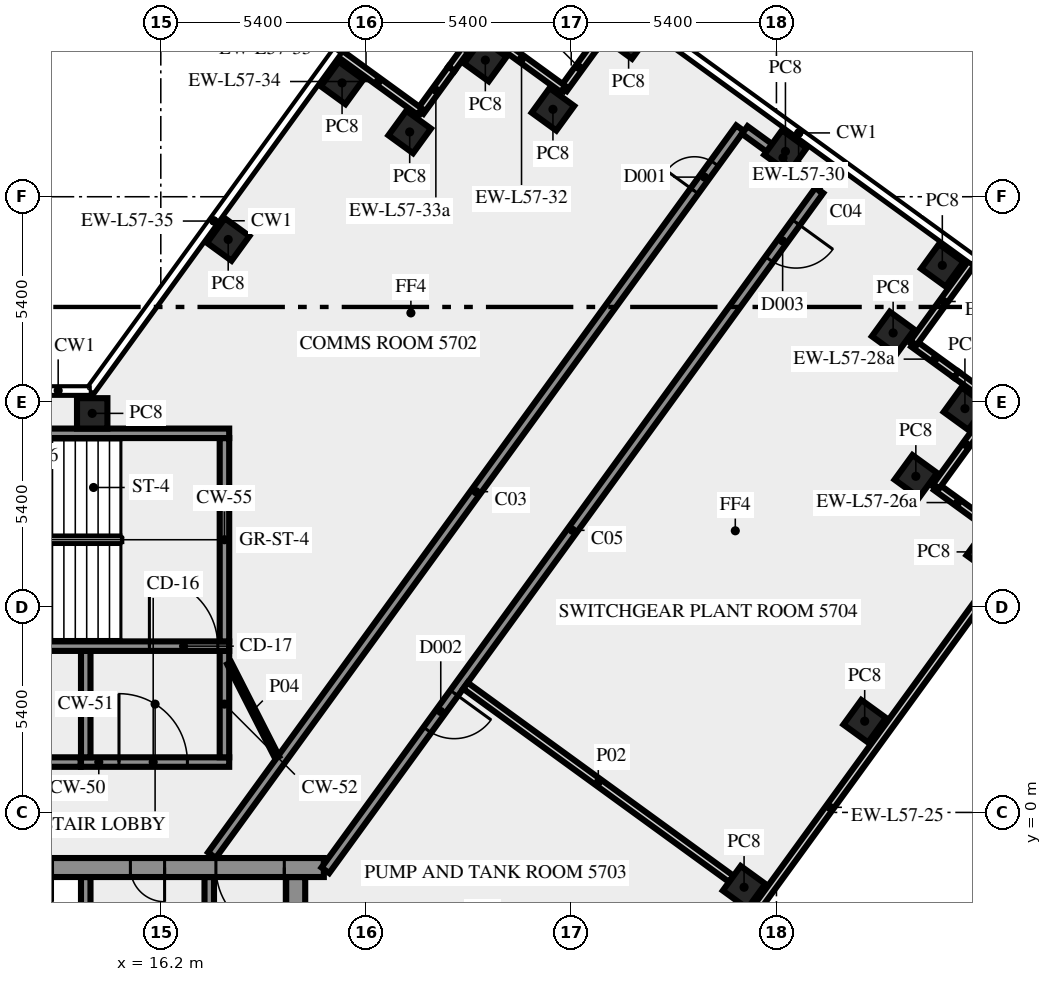
"""IFC4 building model, lengths in metres.
Left out: names, types, materials, properties, quantities, classifications, styles, units other than length and angle.
Written with IfcOpenShell. Run it as: python <this file> out.ifc"""

import sys

from ifc_helpers import new_model, si_unit, direction, frame, frame_2d, origin, origin_2d, place, context, subcontext, project, spatial, rectangle, extrude, element, fill, save


model = new_model("IFC4")
c1 = context("Model", 3, precision=1e-05, world=origin(), true_north=direction((0.0, 1.0)))
c2 = subcontext(c1, "Body", "Model", "MODEL_VIEW")
j1 = project(units=[si_unit("LENGTHUNIT", "METRE"), si_unit("PLANEANGLEUNIT", "RADIAN")], contexts=[c1])
p1 = place(None, origin())
s1 = spatial("IfcSite", under=j1, at=p1, CompositionType="ELEMENT")
p2 = place(p1, origin())
s2 = spatial("IfcBuilding", under=s1, at=p2, CompositionType="ELEMENT")
p3 = place(p2, frame((0.0, 0.0, 242.0)))
s3 = spatial("IfcBuildingStorey", under=s2, at=p3, CompositionType="ELEMENT", Elevation=242.0)
for number, where, z_axis, x_axis in (
    (1, (31.548, -1.969, 0.0), (0.0, 0.0, 1.0), (0.588, 0.809, 0.0)),
    (2, (34.722, 2.4, 0.0), (0.0, 0.0, 1.0), (0.588, 0.809, 0.0)),
    (3, (37.96, 6.855, 0.0), (0.0, 0.0, 1.0), (0.588, 0.809, 0.0)),
    (4, (36.068, 8.844, 0.0), (0.0, 0.0, 1.0), (0.588, 0.809, 0.0)),
    (5, (37.36, 10.625, 0.0), (0.0, 0.0, 1.0), (0.588, 0.809, 0.0)),
    (6, (35.471, 12.616, 0.0), (0.0, 0.0, 1.0), (-0.809, 0.588, 0.0)),
    (7, (36.765, 14.395, 0.0), (0.0, 0.0, 1.0), (-0.809, 0.588, 0.0)),
    (8, (32.637, 17.393, 0.0), (0.0, 0.0, 1.0), (-0.809, 0.588, 0.0)),
    (9, (28.51, 20.39, 0.0), (0.0, 0.0, 1.0), (-0.588, -0.809, 0.0)),
    (10, (26.519, 18.5, 0.0), (0.0, 0.0, 1.0), (-0.809, 0.588, 0.0)),
    (11, (24.74, 19.795, 0.0), (0.0, 0.0, 1.0), (-0.588, -0.809, 0.0)),
    (12, (22.749, 17.904, 0.0), (0.0, 0.0, 1.0), (-0.588, -0.809, 0.0)),
    (13, (20.97, 19.195, 0.0), (0.0, 0.0, 1.0), (-0.588, -0.809, 0.0)),
    (14, (17.974, 15.075, 0.0), (0.0, 0.0, 1.0), (-0.588, -0.809, 0.0)),
    (15, (14.395, 10.5, 0.0), (0.0, 0.0, 1.0), (-1.0, 0.0, 0.0)),
):
    element("IfcColumn", number, at=place(p3, frame(where, z_axis=z_axis, x_axis=x_axis)), inside=s3, PredefinedType="COLUMN", context=c2, shape_type="SweptSolid", body=[
        extrude(rectangle(XDim=0.8, YDim=0.8, at=origin_2d()), origin(), (0.0, 0.0, 1.0), 5.6),
    ])
p4 = place(p3, frame((28.82, -6.724, 0.0), z_axis=(0.0, 0.0, 1.0), x_axis=(0.587789790223, 0.809013697356, 0.0)))
e16 = element("IfcWall", 16, at=p4, inside=s3, PredefinedType="SOLIDWALL", context=c2, shape_type="SweptSolid", body=[
    extrude(rectangle(XDim=16.956, YDim=0.2, at=frame_2d((8.478, 0.0))), origin(), (0.0, 0.0, 1.0), 5.6),
])
p5 = place(p3, frame((37.735, 7.742, 0.0), z_axis=(0.0, 0.0, 1.0), x_axis=(-0.808970345434, 0.587849453694, 0.0)))
e17 = element("IfcWall", 17, at=p5, inside=s3, PredefinedType="SOLIDWALL", context=c2, shape_type="SweptSolid", body=[
    extrude(rectangle(XDim=1.397, YDim=0.2, at=frame_2d((0.698, 0.0))), origin(), (0.0, 0.0, 1.0), 4.1),
])
p6 = place(p3, frame((36.602, 8.58, 0.0), z_axis=(0.0, 0.0, 1.0), x_axis=(0.587822180636, 0.808990163075, 0.0)))
e18 = element("IfcWall", 18, at=p6, inside=s3, PredefinedType="SOLIDWALL", context=c2, shape_type="SweptSolid", body=[
    extrude(rectangle(XDim=2.7, YDim=0.2, at=frame_2d((1.35, 0.0))), origin(), (0.0, 0.0, 1.0), 5.6),
])
p7 = place(p3, frame((38.192, 10.748, 0.0), z_axis=(0.0, 0.0, 1.0), x_axis=(-0.808985145084, 0.587829086584, 0.0)))
e19 = element("IfcWall", 19, at=p7, inside=s3, PredefinedType="SOLIDWALL", context=c2, shape_type="SweptSolid", body=[
    extrude(rectangle(XDim=1.314, YDim=0.2, at=frame_2d((0.657, 0.0))), origin(), (0.0, 0.0, 1.0), 5.6),
])
p8 = place(p3, frame((37.129, 11.52, 0.0), z_axis=(0.0, 0.0, 1.0), x_axis=(-0.809078659976, 0.58770036751, 0.0)))
e20 = element("IfcWall", 20, at=p8, inside=s3, PredefinedType="SOLIDWALL", context=c2, shape_type="SweptSolid", body=[
    extrude(rectangle(XDim=1.386, YDim=0.2, at=frame_2d((0.693, 0.0))), origin(), (0.0, 0.0, 1.0), 4.1),
])
p9 = place(p3, frame((36.005, 12.352, 0.0), z_axis=(0.0, 0.0, 1.0), x_axis=(0.587762999008, 0.809033161865, 0.0)))
e21 = element("IfcWall", 21, at=p9, inside=s3, PredefinedType="SOLIDWALL", context=c2, shape_type="SweptSolid", body=[
    extrude(rectangle(XDim=2.7, YDim=0.2, at=frame_2d((1.35, 0.0))), origin(), (0.0, 0.0, 1.0), 5.6),
])
p10 = place(p3, frame((37.594, 14.519, 0.0), z_axis=(0.0, 0.0, 1.0), x_axis=(-0.809023074878, 0.587776883106, 0.0)))
e22 = element("IfcWall", 22, at=p10, inside=s3, PredefinedType="SOLIDWALL", context=c2, shape_type="SweptSolid", body=[
    extrude(rectangle(XDim=11.4, YDim=0.2, at=frame_2d((5.7, 0.0))), origin(), (0.0, 0.0, 1.0), 5.6),
])
p11 = place(p3, frame((27.616, 20.16, 0.0), z_axis=(0.0, 0.0, 1.0), x_axis=(-0.587731903943, -0.809055751533, 0.0)))
e23 = element("IfcWall", 23, at=p11, inside=s3, PredefinedType="SOLIDWALL", context=c2, shape_type="SweptSolid", body=[
    extrude(rectangle(XDim=1.386, YDim=0.2, at=frame_2d((0.693, 0.0))), origin(), (0.0, 0.0, 1.0), 4.1),
])
p12 = place(p3, frame((26.785, 19.036, 0.0), z_axis=(0.0, 0.0, 1.0), x_axis=(-0.809064397168, 0.587720002413, 0.0)))
e24 = element("IfcWall", 24, at=p12, inside=s3, PredefinedType="SOLIDWALL", context=c2, shape_type="SweptSolid", body=[
    extrude(rectangle(XDim=2.7, YDim=0.2, at=frame_2d((1.35, 0.0))), origin(), (0.0, 0.0, 1.0), 5.6),
])
p13 = place(p3, frame((24.617, 20.625, 0.0), z_axis=(0.0, 0.0, 1.0), x_axis=(-0.587772972264, -0.809025916196, 0.0)))
e25 = element("IfcWall", 25, at=p13, inside=s3, PredefinedType="SOLIDWALL", context=c2, shape_type="SweptSolid", body=[
    extrude(rectangle(XDim=1.311, YDim=0.2, at=frame_2d((0.655, 0.0))), origin(), (0.0, 0.0, 1.0), 5.6),
])
p14 = place(p3, frame((23.846, 19.565, 0.0), z_axis=(0.0, 0.0, 1.0), x_axis=(-0.587753586678, -0.809039999844, 0.0)))
e26 = element("IfcWall", 26, at=p14, inside=s3, PredefinedType="SOLIDWALL", context=c2, shape_type="SweptSolid", body=[
    extrude(rectangle(XDim=1.389, YDim=0.2, at=frame_2d((0.694, 0.0))), origin(), (0.0, 0.0, 1.0), 4.1),
])
p15 = place(p3, frame((23.013, 18.438, 0.0), z_axis=(0.0, 0.0, 1.0), x_axis=(-0.808990163075, 0.587822180636, 0.0)))
e27 = element("IfcWall", 27, at=p15, inside=s3, PredefinedType="SOLIDWALL", context=c2, shape_type="SweptSolid", body=[
    extrude(rectangle(XDim=2.7, YDim=0.2, at=frame_2d((1.35, 0.0))), origin(), (0.0, 0.0, 1.0), 5.6),
])
p16 = place(p3, frame((20.846, 20.028, 0.0), z_axis=(0.0, 0.0, 1.0), x_axis=(-0.58779571445, -0.809009393069, 0.0)))
e28 = element("IfcWall", 28, at=p16, inside=s3, PredefinedType="SOLIDWALL", context=c2, shape_type="SweptSolid", body=[
    extrude(rectangle(XDim=11.044, YDim=0.2, at=frame_2d((5.522, 0.0))), origin(), (0.0, 0.0, 1.0), 5.6),
])
p17 = place(p3, frame((14.344, 11.088, 0.0), z_axis=(0.0, 0.0, 1.0), x_axis=(-1.0, 0.0, 0.0)))
e29 = element("IfcWall", 29, at=p17, inside=s3, PredefinedType="SOLIDWALL", context=c2, shape_type="SweptSolid", body=[
    extrude(rectangle(XDim=28.688, YDim=0.2, at=frame_2d((14.344, 0.0))), origin(), (0.0, 0.0, 1.0), 5.6),
])
p18 = place(p3, frame((19.75, -10.5, 0.0), z_axis=(0.0, 0.0, 1.0), x_axis=(0.0, 1.0, 0.0)))
e30 = element("IfcWall", 30, at=p18, inside=s3, PredefinedType="SHEAR", context=c2, shape_type="SweptSolid", body=[
    extrude(rectangle(XDim=8.8, YDim=0.5, at=frame_2d((4.4, 0.0))), origin(), (0.0, 0.0, 1.0), 5.6),
])
p19 = place(p3, frame((14.225, -6.0, 0.0), z_axis=(0.0, 0.0, 1.0), x_axis=(0.0, 1.0, 0.0)))
e31 = element("IfcWall", 31, at=p19, inside=s3, PredefinedType="SHEAR", context=c2, shape_type="SweptSolid", body=[
    extrude(rectangle(XDim=4.3, YDim=0.25, at=frame_2d((2.15, 0.0))), origin(), (0.0, 0.0, 1.0), 5.6),
])
p20 = place(p3, frame((17.475, -6.0, 0.0), z_axis=(0.0, 0.0, 1.0), x_axis=(0.0, 1.0, 0.0)))
e32 = element("IfcWall", 32, at=p20, inside=s3, PredefinedType="SHEAR", context=c2, shape_type="SweptSolid", body=[
    extrude(rectangle(XDim=4.3, YDim=0.25, at=frame_2d((2.15, 0.0))), origin(), (0.0, 0.0, 1.0), 5.6),
])
p21 = place(p20, frame((0.55, 0.0, 0.0)))
e33 = element("IfcOpeningElement", 33, at=p21, cuts=e32, PredefinedType="OPENING", context=c2, shape_type="SweptSolid", body=[
    extrude(rectangle(XDim=1.3, YDim=2.1, at=frame_2d((0.65, 1.05))), frame((0.0, 0.135, 0.0), z_axis=(0.0, -1.0, 0.0), x_axis=(1.0, 0.0, 0.0)), (0.0, 0.0, 1.0), 0.27),
])
p22 = place(p3, frame((20.49, -1.45, 0.0), z_axis=(0.0, 0.0, 1.0), x_axis=(-1.0, 0.0, 0.0)))
e34 = element("IfcWall", 34, at=p22, inside=s3, PredefinedType="SHEAR", context=c2, shape_type="SweptSolid", body=[
    extrude(rectangle(XDim=40.98, YDim=0.5, at=frame_2d((20.49, 0.0))), origin(), (0.0, 0.0, 1.0), 5.6),
])
p23 = place(p22, frame((38.14, 0.0, 0.0)))
e35 = element("IfcOpeningElement", 35, at=p23, cuts=e34, PredefinedType="OPENING", context=c2, shape_type="SweptSolid", body=[
    extrude(rectangle(XDim=1.8, YDim=2.1, at=frame_2d((0.9, 1.05))), frame((0.0, 0.26, 0.0), z_axis=(0.0, -1.0, 0.0), x_axis=(1.0, 0.0, 0.0)), (0.0, 0.0, 1.0), 0.52),
])
p24 = place(p22, frame((36.728, 0.0, 0.0)))
e36 = element("IfcOpeningElement", 36, at=p24, cuts=e34, PredefinedType="OPENING", context=c2, shape_type="SweptSolid", body=[
    extrude(rectangle(XDim=0.8, YDim=2.1, at=frame_2d((0.4, 1.05))), frame((0.0, 0.26, 0.0), z_axis=(0.0, -1.0, 0.0), x_axis=(1.0, 0.0, 0.0)), (0.0, 0.0, 1.0), 0.52),
])
p25 = place(p22, frame((35.153, 0.0, 0.0)))
e37 = element("IfcOpeningElement", 37, at=p25, cuts=e34, PredefinedType="OPENING", context=c2, shape_type="SweptSolid", body=[
    extrude(rectangle(XDim=0.8, YDim=2.1, at=frame_2d((0.4, 1.05))), frame((0.0, 0.26, 0.0), z_axis=(0.0, -1.0, 0.0), x_axis=(1.0, 0.0, 0.0)), (0.0, 0.0, 1.0), 0.52),
])
p26 = place(p22, frame((32.94, 0.0, 0.0)))
e38 = element("IfcOpeningElement", 38, at=p26, cuts=e34, PredefinedType="OPENING", context=c2, shape_type="SweptSolid", body=[
    extrude(rectangle(XDim=0.9, YDim=2.1, at=frame_2d((0.45, 1.05))), frame((0.0, 0.26, 0.0), z_axis=(0.0, -1.0, 0.0), x_axis=(1.0, 0.0, 0.0)), (0.0, 0.0, 1.0), 0.52),
])
p27 = place(p22, frame((20.74, 0.0, 0.0)))
e39 = element("IfcOpeningElement", 39, at=p27, cuts=e34, PredefinedType="OPENING", context=c2, shape_type="SweptSolid", body=[
    extrude(rectangle(XDim=2.0, YDim=2.1, at=frame_2d((1.0, 1.05))), frame((0.0, 0.26, 0.0), z_axis=(0.0, -1.0, 0.0), x_axis=(1.0, 0.0, 0.0)), (0.0, 0.0, 1.0), 0.52),
])
p28 = place(p22, frame((7.14, 0.0, 0.0)))
e40 = element("IfcOpeningElement", 40, at=p28, cuts=e34, PredefinedType="OPENING", context=c2, shape_type="SweptSolid", body=[
    extrude(rectangle(XDim=0.9, YDim=2.1, at=frame_2d((0.45, 1.05))), frame((0.0, 0.26, 0.0), z_axis=(0.0, -1.0, 0.0), x_axis=(1.0, 0.0, 0.0)), (0.0, 0.0, 1.0), 0.52),
])
p29 = place(p22, frame((4.19, 0.0, 0.0)))
e41 = element("IfcOpeningElement", 41, at=p29, cuts=e34, PredefinedType="OPENING", context=c2, shape_type="SweptSolid", body=[
    extrude(rectangle(XDim=0.9, YDim=2.1, at=frame_2d((0.45, 1.05))), frame((0.0, 0.26, 0.0), z_axis=(0.0, -1.0, 0.0), x_axis=(1.0, 0.0, 0.0)), (0.0, 0.0, 1.0), 0.52),
])
p30 = place(p22, frame((1.04, 0.0, 0.0)))
e42 = element("IfcOpeningElement", 42, at=p30, cuts=e34, PredefinedType="OPENING", context=c2, shape_type="SweptSolid", body=[
    extrude(rectangle(XDim=1.8, YDim=2.1, at=frame_2d((0.9, 1.05))), frame((0.0, 0.26, 0.0), z_axis=(0.0, -1.0, 0.0), x_axis=(1.0, 0.0, 0.0)), (0.0, 0.0, 1.0), 0.52),
])
p31 = place(p3, frame((14.1, 1.325, 0.0), z_axis=(0.0, 0.0, 1.0), x_axis=(1.0, 0.0, 0.0)))
e43 = element("IfcWall", 43, at=p31, inside=s3, PredefinedType="SHEAR", context=c2, shape_type="SweptSolid", body=[
    extrude(rectangle(XDim=3.9, YDim=0.25, at=frame_2d((1.95, 0.0))), origin(), (0.0, 0.0, 1.0), 5.6),
])
p32 = place(p31, frame((1.0, 0.0, 0.0)))
e44 = element("IfcOpeningElement", 44, at=p32, cuts=e43, PredefinedType="OPENING", context=c2, shape_type="SweptSolid", body=[
    extrude(rectangle(XDim=1.8, YDim=2.1, at=frame_2d((0.9, 1.05))), frame((0.0, 0.135, 0.0), z_axis=(0.0, -1.0, 0.0), x_axis=(1.0, 0.0, 0.0)), (0.0, 0.0, 1.0), 0.27),
])
for number, where, z_axis, x_axis in (
    (45, (14.225, 1.45, 0.0), (0.0, 0.0, 1.0), (0.0, 1.0, 0.0)),
    (46, (17.875, 1.45, 0.0), (0.0, 0.0, 1.0), (0.0, 1.0, 0.0)),
):
    element("IfcWall", number, at=place(p3, frame(where, z_axis=z_axis, x_axis=x_axis)), inside=s3, PredefinedType="SHEAR", context=c2, shape_type="SweptSolid", body=[
        extrude(rectangle(XDim=2.8, YDim=0.25, at=frame_2d((1.4, 0.0))), origin(), (0.0, 0.0, 1.0), 5.6),
    ])
p33 = place(p3, frame((7.5, 4.375, 0.0), z_axis=(0.0, 0.0, 1.0), x_axis=(1.0, 0.0, 0.0)))
e47 = element("IfcWall", 47, at=p33, inside=s3, PredefinedType="SHEAR", context=c2, shape_type="SweptSolid", body=[
    extrude(rectangle(XDim=10.5, YDim=0.25, at=frame_2d((5.25, 0.0))), origin(), (0.0, 0.0, 1.0), 5.6),
])
p34 = place(p33, frame((8.4, 0.0, 0.0)))
e48 = element("IfcOpeningElement", 48, at=p34, cuts=e47, PredefinedType="OPENING", context=c2, shape_type="SweptSolid", body=[
    extrude(rectangle(XDim=1.8, YDim=2.1, at=frame_2d((0.9, 1.05))), frame((0.0, 0.135, 0.0), z_axis=(0.0, -1.0, 0.0), x_axis=(1.0, 0.0, 0.0)), (0.0, 0.0, 1.0), 0.27),
])
p35 = place(p3, frame((17.875, 4.5, 0.0), z_axis=(0.0, 0.0, 1.0), x_axis=(0.0, 1.0, 0.0)))
e49 = element("IfcWall", 49, at=p35, inside=s3, PredefinedType="SHEAR", context=c2, shape_type="SweptSolid", body=[
    extrude(rectangle(XDim=5.35, YDim=0.25, at=frame_2d((2.675, 0.0))), origin(), (0.0, 0.0, 1.0), 5.6),
])
p36 = place(p3, frame((7.5, 9.975, 0.0), z_axis=(0.0, 0.0, 1.0), x_axis=(1.0, 0.0, 0.0)))
e50 = element("IfcWall", 50, at=p36, inside=s3, PredefinedType="SHEAR", context=c2, shape_type="SweptSolid", body=[
    extrude(rectangle(XDim=10.5, YDim=0.25, at=frame_2d((5.25, 0.0))), origin(), (0.0, 0.0, 1.0), 5.6),
])
p37 = place(p36, frame((2.0, 0.0, 1.0)))
e51 = element("IfcOpeningElement", 51, at=p37, cuts=e50, PredefinedType="OPENING", context=c2, shape_type="SweptSolid", body=[
    extrude(rectangle(XDim=1.2, YDim=1.2, at=frame_2d((0.6, 0.6))), frame((0.0, 0.135, 0.0), z_axis=(0.0, -1.0, 0.0), x_axis=(1.0, 0.0, 0.0)), (0.0, 0.0, 1.0), 0.27),
])
p38 = place(p3, frame((6.754, 1.325, 0.0), z_axis=(0.0, 0.0, 1.0), x_axis=(1.0, 0.0, 0.0)))
e52 = element("IfcWall", 52, at=p38, inside=s3, PredefinedType="SOLIDWALL", context=c2, shape_type="SweptSolid", body=[
    extrude(rectangle(XDim=7.336, YDim=0.25, at=frame_2d((3.668, 0.0))), origin(), (0.0, 0.0, 1.0), 5.6),
])
p39 = place(p38, frame((2.771, 0.0, 0.0)))
e53 = element("IfcOpeningElement", 53, at=p39, cuts=e52, PredefinedType="OPENING", context=c2, shape_type="SweptSolid", body=[
    extrude(rectangle(XDim=1.8, YDim=2.1, at=frame_2d((0.9, 1.05))), frame((0.0, 0.135, 0.0), z_axis=(0.0, -1.0, 0.0), x_axis=(1.0, 0.0, 0.0)), (0.0, 0.0, 1.0), 0.27),
])
p40 = place(p3, frame((17.545, -1.125, 0.0), z_axis=(0.0, 0.0, 1.0), x_axis=(0.587789755823, 0.80901372235, 0.0)))
e54 = element("IfcWall", 54, at=p40, inside=s3, PredefinedType="SOLIDWALL", context=c2, shape_type="SweptSolid", body=[
    extrude(rectangle(XDim=23.645, YDim=0.25, at=frame_2d((11.822, 0.0))), origin(), (0.0, 0.0, 1.0), 5.6),
])
p41 = place(p40, frame((21.603, 0.0, 0.0)))
e55 = element("IfcOpeningElement", 55, at=p41, cuts=e54, PredefinedType="OPENING", context=c2, shape_type="SweptSolid", body=[
    extrude(rectangle(XDim=0.9, YDim=2.1, at=frame_2d((0.45, 1.05))), frame((0.0, 0.135, 0.0), z_axis=(0.0, -1.0, 0.0), x_axis=(1.0, 0.0, 0.0)), (0.0, 0.0, 1.0), 0.27),
])
p42 = place(p3, frame((31.567, 17.956, 0.0), z_axis=(0.0, 0.0, 1.0), x_axis=(0.809011863271, -0.587792314586, 0.0)))
e56 = element("IfcWall", 56, at=p42, inside=s3, PredefinedType="SOLIDWALL", context=c2, shape_type="SweptSolid", body=[
    extrude(rectangle(XDim=2.488, YDim=0.25, at=frame_2d((1.244, 0.0))), origin(), (0.0, 0.0, 1.0), 5.6),
])
p43 = place(p3, frame((33.531, 16.369, 0.0), z_axis=(0.0, 0.0, 1.0), x_axis=(-0.587781095509, -0.809020014438, 0.0)))
e57 = element("IfcWall", 57, at=p43, inside=s3, PredefinedType="SOLIDWALL", context=c2, shape_type="SweptSolid", body=[
    extrude(rectangle(XDim=22.117, YDim=0.25, at=frame_2d((11.058, 0.0))), origin(), (0.0, 0.0, 1.0), 5.6),
])
p44 = place(p43, frame((16.352, 0.0, 0.0)))
e58 = element("IfcOpeningElement", 58, at=p44, cuts=e57, PredefinedType="OPENING", context=c2, shape_type="SweptSolid", body=[
    extrude(rectangle(XDim=1.2, YDim=2.1, at=frame_2d((0.6, 1.05))), frame((0.0, 0.135, 0.0), z_axis=(0.0, -1.0, 0.0), x_axis=(1.0, 0.0, 0.0)), (0.0, 0.0, 1.0), 0.27),
])
p45 = place(p43, frame((1.046, 0.0, 0.0)))
e59 = element("IfcOpeningElement", 59, at=p45, cuts=e57, PredefinedType="OPENING", context=c2, shape_type="SweptSolid", body=[
    extrude(rectangle(XDim=1.2, YDim=2.1, at=frame_2d((0.6, 1.05))), frame((0.0, 0.135, 0.0), z_axis=(0.0, -1.0, 0.0), x_axis=(1.0, 0.0, 0.0)), (0.0, 0.0, 1.0), 0.27),
])
p46 = place(p3, frame((31.209, -1.747, 0.0), z_axis=(0.0, 0.0, 1.0), x_axis=(-0.80898392027, 0.587830772199, 0.0)))
e60 = element("IfcWall", 60, at=p46, inside=s3, PredefinedType="SOLIDWALL", context=c2, shape_type="SweptSolid", body=[
    extrude(rectangle(XDim=8.645, YDim=0.2, at=frame_2d((4.323, 0.0))), origin(), (0.0, 0.0, 1.0), 5.6),
])
p47 = place(p3, frame((18.0, 3.925, 0.0), z_axis=(0.0, 0.0, 1.0), x_axis=(0.453950796792, -0.891026752736, 0.0)))
e61 = element("IfcWall", 61, at=p47, inside=s3, PredefinedType="PARTITIONING", context=c2, shape_type="SweptSolid", body=[
    extrude(rectangle(XDim=2.778, YDim=0.12, at=frame_2d((1.389, 0.0))), origin(), (0.0, 0.0, 1.0), 5.6),
])
p48 = place(p29, origin())
e62 = element("IfcDoor", 62, at=p48, inside=s3, OperationType="SINGLE_SWING_LEFT", PredefinedType="DOOR", context=c2, shape_type="SweptSolid", body=[
    extrude(rectangle(XDim=0.9, YDim=2.1, at=frame_2d((0.45, 1.05))), frame((0.0, 0.025, 0.0), z_axis=(0.0, -1.0, 0.0), x_axis=(1.0, 0.0, 0.0)), (0.0, 0.0, 1.0), 0.05),
])
fill(e41, e62)
p49 = place(p30, origin())
e63 = element("IfcDoor", 63, at=p49, inside=s3, OperationType="DOUBLE_DOOR_SINGLE_SWING", PredefinedType="DOOR", context=c2, shape_type="SweptSolid", body=[
    extrude(rectangle(XDim=1.8, YDim=2.1, at=frame_2d((0.9, 1.05))), frame((0.0, 0.025, 0.0), z_axis=(0.0, -1.0, 0.0), x_axis=(1.0, 0.0, 0.0)), (0.0, 0.0, 1.0), 0.05),
])
fill(e42, e63)
p50 = place(p32, origin())
e64 = element("IfcDoor", 64, at=p50, inside=s3, OperationType="DOUBLE_DOOR_SINGLE_SWING", PredefinedType="DOOR", context=c2, shape_type="SweptSolid", body=[
    extrude(rectangle(XDim=1.8, YDim=2.1, at=frame_2d((0.9, 1.05))), frame((0.0, 0.025, 0.0), z_axis=(0.0, -1.0, 0.0), x_axis=(1.0, 0.0, 0.0)), (0.0, 0.0, 1.0), 0.05),
])
fill(e44, e64)
p51 = place(p34, origin())
e65 = element("IfcDoor", 65, at=p51, inside=s3, OperationType="DOUBLE_DOOR_SINGLE_SWING", PredefinedType="DOOR", context=c2, shape_type="SweptSolid", body=[
    extrude(rectangle(XDim=1.8, YDim=2.1, at=frame_2d((0.9, 1.05))), frame((0.0, 0.025, 0.0), z_axis=(0.0, -1.0, 0.0), x_axis=(1.0, 0.0, 0.0)), (0.0, 0.0, 1.0), 0.05),
])
fill(e48, e65)
p52 = place(p41, origin())
e66 = element("IfcDoor", 66, at=p52, inside=s3, OperationType="SINGLE_SWING_RIGHT", PredefinedType="DOOR", context=c2, shape_type="SweptSolid", body=[
    extrude(rectangle(XDim=0.9, YDim=2.1, at=frame_2d((0.45, 1.05))), frame((0.0, 0.025, 0.0), z_axis=(0.0, -1.0, 0.0), x_axis=(1.0, 0.0, 0.0)), (0.0, 0.0, 1.0), 0.05),
])
fill(e55, e66)
p53 = place(p44, origin())
e67 = element("IfcDoor", 67, at=p53, inside=s3, OperationType="SINGLE_SWING_LEFT", PredefinedType="DOOR", context=c2, shape_type="SweptSolid", body=[
    extrude(rectangle(XDim=1.2, YDim=2.1, at=frame_2d((0.6, 1.05))), frame((0.0, 0.025, 0.0), z_axis=(0.0, -1.0, 0.0), x_axis=(1.0, 0.0, 0.0)), (0.0, 0.0, 1.0), 0.05),
])
fill(e58, e67)
p54 = place(p45, origin())
e68 = element("IfcDoor", 68, at=p54, inside=s3, OperationType="SINGLE_SWING_LEFT", PredefinedType="DOOR", context=c2, shape_type="SweptSolid", body=[
    extrude(rectangle(XDim=1.2, YDim=2.1, at=frame_2d((0.6, 1.05))), frame((0.0, 0.025, 0.0), z_axis=(0.0, -1.0, 0.0), x_axis=(1.0, 0.0, 0.0)), (0.0, 0.0, 1.0), 0.05),
])
fill(e59, e68)
save(model, sys.argv[1])
